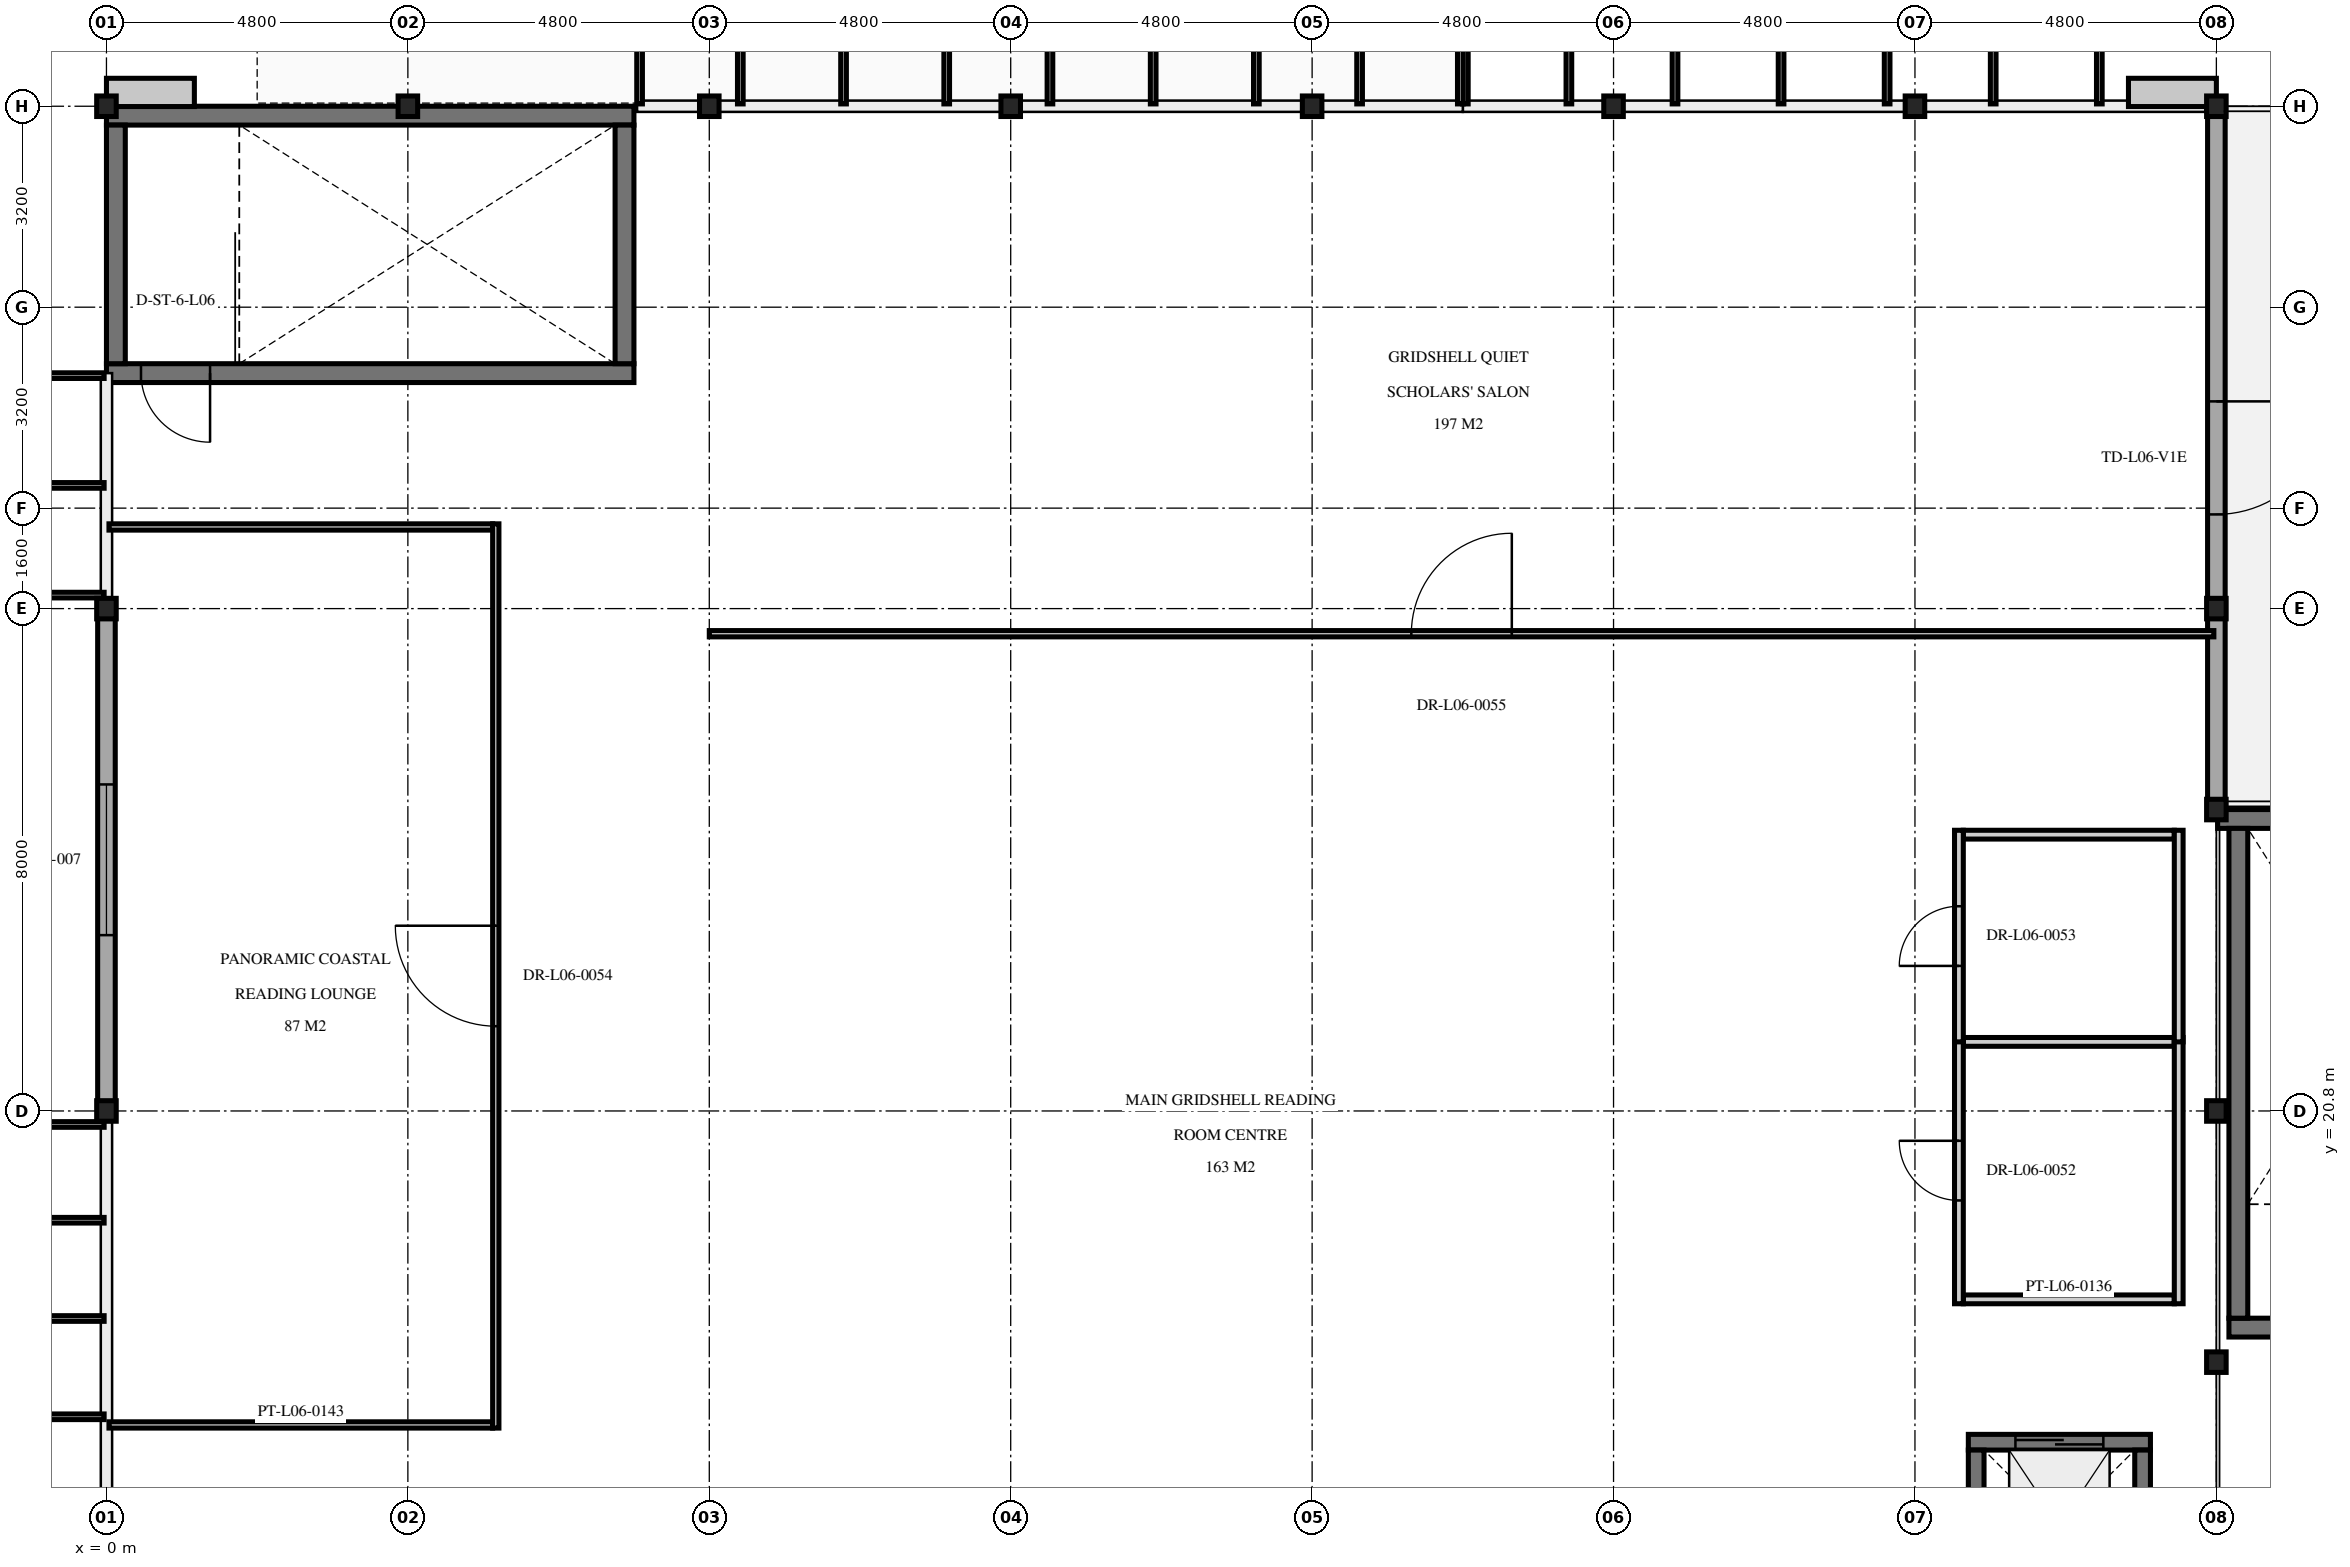
"""IFC4 building model, lengths in metres.
Left out: names, types, materials, properties, quantities, classifications, styles, units other than length and angle.
Written with IfcOpenShell. Run it as: python <this file> out.ifc"""

import sys

from ifc_helpers import new_model, si_unit, direction, frame, frame_2d, origin, origin_2d, place, context, subcontext, project, spatial, rectangle, i_section, extrude, element, fill, save


model = new_model("IFC4")
c1 = context("Model", 3, precision=1e-05, world=origin(), true_north=direction((0.0, 1.0)))
c2 = subcontext(c1, "Body", "Model", "MODEL_VIEW")
j1 = project(units=[si_unit("LENGTHUNIT", "METRE"), si_unit("PLANEANGLEUNIT", "RADIAN")], contexts=[c1])
p1 = place(None, origin())
s1 = spatial("IfcSite", under=j1, at=p1, CompositionType="ELEMENT")
p2 = place(p1, origin())
s2 = spatial("IfcBuilding", under=s1, at=p2, CompositionType="ELEMENT")
p3 = place(p2, frame((0.0, 0.0, 27.6)))
s3 = spatial("IfcBuildingStorey", under=s2, at=p3, CompositionType="ELEMENT", Elevation=27.6)
for number, where, z_axis, x_axis in (
    (1, (0.0, 36.8, 0.0), (0.0, 0.0, 1.0), (1.0, 0.0, 0.0)),
    (2, (4.8, 36.8, 0.0), (0.0, 0.0, 1.0), (1.0, 0.0, 0.0)),
    (3, (9.6, 36.8, 0.0), (0.0, 0.0, 1.0), (1.0, 0.0, 0.0)),
    (4, (14.4, 36.8, 0.0), (0.0, 0.0, 1.0), (1.0, 0.0, 0.0)),
    (5, (19.2, 36.8, 0.0), (0.0, 0.0, 1.0), (1.0, 0.0, 0.0)),
    (6, (24.0, 36.8, 0.0), (0.0, 0.0, 1.0), (1.0, 0.0, 0.0)),
    (7, (28.8, 36.8, 0.0), (0.0, 0.0, 1.0), (1.0, 0.0, 0.0)),
    (8, (33.6, 36.8, 0.0), (0.0, 0.0, 1.0), (1.0, 0.0, 0.0)),
    (9, (0.0, 20.8, 0.0), (0.0, 0.0, 1.0), (1.0, 0.0, 0.0)),
    (10, (0.0, 28.8, 0.0), (0.0, 0.0, 1.0), (1.0, 0.0, 0.0)),
    (11, (33.6, 16.8, 0.0), (0.0, 0.0, 1.0), (1.0, 0.0, 0.0)),
    (12, (33.6, 20.8, 0.0), (0.0, 0.0, 1.0), (1.0, 0.0, 0.0)),
    (13, (33.6, 25.6, 0.0), (0.0, 0.0, 1.0), (1.0, 0.0, 0.0)),
    (14, (33.6, 28.8, 0.0), (0.0, 0.0, 1.0), (1.0, 0.0, 0.0)),
):
    element("IfcColumn", number, at=place(p3, frame(where, z_axis=z_axis, x_axis=x_axis)), inside=s3, PredefinedType="COLUMN", context=c2, shape_type="SweptSolid", body=[
        extrude(i_section(OverallWidth=0.311, OverallDepth=0.327, WebThickness=0.016, FlangeThickness=0.025, at=origin_2d()), origin(), (0.0, 0.0, 1.0), 3.6),
    ])
p4 = place(p3, frame((8.4, 32.55, 0.0), z_axis=(0.0, 0.0, 1.0), x_axis=(-1.0, 0.0, 0.0)))
e15 = element("IfcWall", 15, at=p4, inside=s3, PredefinedType="SHEAR", context=c2, shape_type="SweptSolid", body=[
    extrude(rectangle(XDim=8.4, YDim=0.3, at=frame_2d((4.2, 0.0))), origin(), (0.0, 0.0, 1.0), 4.015),
])
p5 = place(p4, frame((6.75, 0.0, 0.0)))
e16 = element("IfcOpeningElement", 16, at=p5, cuts=e15, PredefinedType="OPENING", context=c2, shape_type="SweptSolid", body=[
    extrude(rectangle(XDim=1.1, YDim=2.2, at=frame_2d((0.55, 1.1))), frame((0.0, 0.16, 0.0), z_axis=(0.0, -1.0, 0.0), x_axis=(1.0, 0.0, 0.0)), (0.0, 0.0, 1.0), 0.32),
])
p6 = place(p3, frame((0.0, 36.65, 0.0), z_axis=(0.0, 0.0, 1.0), x_axis=(1.0, 0.0, 0.0)))
e17 = element("IfcWall", 17, at=p6, inside=s3, PredefinedType="SHEAR", context=c2, shape_type="SweptSolid", body=[
    extrude(rectangle(XDim=8.4, YDim=0.3, at=frame_2d((4.2, 0.0))), origin(), (0.0, 0.0, 1.0), 4.015),
])
for number, where, z_axis, x_axis in (
    (18, (0.15, 32.7, 0.0), (0.0, 0.0, 1.0), (0.0, 1.0, 0.0)),
    (19, (8.25, 36.5, 0.0), (0.0, 0.0, 1.0), (0.0, -1.0, 0.0)),
):
    element("IfcWall", number, at=place(p3, frame(where, z_axis=z_axis, x_axis=x_axis)), inside=s3, PredefinedType="SHEAR", context=c2, shape_type="SweptSolid", body=[
        extrude(rectangle(XDim=3.8, YDim=0.3, at=frame_2d((1.9, 0.0))), origin(), (0.0, 0.0, 1.0), 4.015),
    ])
p7 = place(p3, frame((38.2, 17.35, 0.0), z_axis=(0.0, 0.0, 1.0), x_axis=(-1.0, 0.0, 0.0)))
e20 = element("IfcWall", 20, at=p7, inside=s3, PredefinedType="SHEAR", context=c2, shape_type="SweptSolid", body=[
    extrude(rectangle(XDim=4.4, YDim=0.3, at=frame_2d((2.2, 0.0))), origin(), (0.0, 0.0, 1.0), 3.955),
])
p8 = place(p7, frame((1.65, 0.0, 0.0)))
e21 = element("IfcOpeningElement", 21, at=p8, cuts=e20, PredefinedType="OPENING", context=c2, shape_type="SweptSolid", body=[
    extrude(rectangle(XDim=1.1, YDim=2.2, at=frame_2d((0.55, 1.1))), frame((0.0, 0.16, 0.0), z_axis=(0.0, -1.0, 0.0), x_axis=(1.0, 0.0, 0.0)), (0.0, 0.0, 1.0), 0.32),
])
p9 = place(p3, frame((33.62, 25.45, 0.0), z_axis=(0.0, 0.0, 1.0), x_axis=(1.0, 0.0, 0.0)))
e22 = element("IfcWall", 22, at=p9, inside=s3, PredefinedType="SHEAR", context=c2, shape_type="SweptSolid", body=[
    extrude(rectangle(XDim=4.76, YDim=0.3, at=frame_2d((2.38, 0.0))), origin(), (0.0, 0.0, 1.0), 3.955),
])
p10 = place(p3, frame((33.95, 17.5, 0.0), z_axis=(0.0, 0.0, 1.0), x_axis=(0.0, 1.0, 0.0)))
e23 = element("IfcWall", 23, at=p10, inside=s3, PredefinedType="SHEAR", context=c2, shape_type="SweptSolid", body=[
    extrude(rectangle(XDim=7.8, YDim=0.3, at=frame_2d((3.9, 0.0))), origin(), (0.0, 0.0, 1.0), 3.955),
])
p11 = place(p3, frame((29.65, 15.525, 0.0), z_axis=(0.0, 0.0, 1.0), x_axis=(1.0, 0.0, 0.0)))
e24 = element("IfcWall", 24, at=p11, inside=s3, PredefinedType="SHEAR", context=c2, shape_type="SweptSolid", body=[
    extrude(rectangle(XDim=2.9, YDim=0.25, at=frame_2d((1.45, 0.0))), origin(), (0.0, 0.0, 1.0), 4.015),
])
p12 = place(p11, frame((0.75, 0.0, 0.0)))
e25 = element("IfcOpeningElement", 25, at=p12, cuts=e24, PredefinedType="OPENING", context=c2, shape_type="SweptSolid", body=[
    extrude(rectangle(XDim=1.4, YDim=2.2, at=frame_2d((0.7, 1.1))), frame((0.0, 0.135, 0.0), z_axis=(0.0, -1.0, 0.0), x_axis=(1.0, 0.0, 0.0)), (0.0, 0.0, 1.0), 0.27),
])
for number, where, z_axis, x_axis in (
    (26, (29.775, 13.0, 0.0), (0.0, 0.0, 1.0), (0.0, 1.0, 0.0)),
    (27, (32.425, 15.4, 0.0), (0.0, 0.0, 1.0), (0.0, -1.0, 0.0)),
):
    element("IfcWall", number, at=place(p3, frame(where, z_axis=z_axis, x_axis=x_axis)), inside=s3, PredefinedType="SHEAR", context=c2, shape_type="SweptSolid", body=[
        extrude(rectangle(XDim=2.4, YDim=0.25, at=frame_2d((1.2, 0.0))), origin(), (0.0, 0.0, 1.0), 4.015),
    ])
p13 = place(p3, frame((0.0, 20.715, 0.0), z_axis=(0.0, 0.0, 1.0), x_axis=(0.0, 1.0, 0.0)))
e28 = element("IfcWall", 28, at=p13, inside=s3, PredefinedType="SOLIDWALL", context=c2, shape_type="SweptSolid", body=[
    extrude(rectangle(XDim=8.17, YDim=0.28, at=frame_2d((4.085, 0.0))), origin(), (0.0, 0.0, 1.0), 3.575),
])
p14 = place(p13, frame((2.885, 0.0, 0.95)))
e29 = element("IfcOpeningElement", 29, at=p14, cuts=e28, PredefinedType="OPENING", context=c2, shape_type="SweptSolid", body=[
    extrude(rectangle(XDim=2.4, YDim=2.1, at=frame_2d((1.2, 1.05))), frame((0.0, 0.15, 0.0), z_axis=(0.0, -1.0, 0.0), x_axis=(1.0, 0.0, 0.0)), (0.0, 0.0, 1.0), 0.3),
])
p15 = place(p3, frame((33.6, 36.885, 0.0), z_axis=(0.0, 0.0, 1.0), x_axis=(0.0, -1.0, 0.0)))
e30 = element("IfcWall", 30, at=p15, inside=s3, PredefinedType="SOLIDWALL", context=c2, shape_type="SweptSolid", body=[
    extrude(rectangle(XDim=11.37, YDim=0.28, at=frame_2d((5.685, 0.0))), origin(), (0.0, 0.0, 1.0), 3.185),
])
p16 = place(p15, frame((4.785, 0.0, 0.0)))
e31 = element("IfcOpeningElement", 31, at=p16, cuts=e30, PredefinedType="OPENING", context=c2, shape_type="SweptSolid", body=[
    extrude(rectangle(XDim=1.8, YDim=2.3, at=frame_2d((0.9, 1.15))), frame((0.0, 0.15, 0.0), z_axis=(0.0, -1.0, 0.0), x_axis=(1.0, 0.0, 0.0)), (0.0, 0.0, 1.0), 0.3),
])
for number, where, z_axis, x_axis in (
    (32, (29.57, 17.8, 0.0), (0.0, 0.0, 1.0), (1.0, 0.0, 0.0)),
    (33, (29.57, 21.9, 0.0), (0.0, 0.0, 1.0), (1.0, 0.0, 0.0)),
):
    element("IfcWall", number, at=place(p3, frame(where, z_axis=z_axis, x_axis=x_axis)), inside=s3, PredefinedType="PARTITIONING", context=c2, shape_type="SweptSolid", body=[
        extrude(rectangle(XDim=3.36, YDim=0.14, at=frame_2d((1.68, 0.0))), origin(), (0.0, 0.0, 1.0), 4.0),
    ])
p17 = place(p3, frame((29.5, 17.73, 0.0), z_axis=(0.0, 0.0, 1.0), x_axis=(0.0, 1.0, 0.0)))
e34 = element("IfcWall", 34, at=p17, inside=s3, PredefinedType="PARTITIONING", context=c2, shape_type="SweptSolid", body=[
    extrude(rectangle(XDim=4.24, YDim=0.14, at=frame_2d((2.12, 0.0))), origin(), (0.0, 0.0, 1.0), 4.0),
])
p18 = place(p17, frame((1.645, 0.0, 0.0)))
e35 = element("IfcOpeningElement", 35, at=p18, cuts=e34, PredefinedType="OPENING", context=c2, shape_type="SweptSolid", body=[
    extrude(rectangle(XDim=0.95, YDim=2.1, at=frame_2d((0.475, 1.05))), frame((0.0, 0.08, 0.0), z_axis=(0.0, -1.0, 0.0), x_axis=(1.0, 0.0, 0.0)), (0.0, 0.0, 1.0), 0.16),
])
p19 = place(p3, frame((33.0, 17.73, 0.0), z_axis=(0.0, 0.0, 1.0), x_axis=(0.0, 1.0, 0.0)))
e36 = element("IfcWall", 36, at=p19, inside=s3, PredefinedType="PARTITIONING", context=c2, shape_type="SweptSolid", body=[
    extrude(rectangle(XDim=4.24, YDim=0.14, at=frame_2d((2.12, 0.0))), origin(), (0.0, 0.0, 1.0), 4.0),
])
p20 = place(p3, frame((29.57, 25.2, 0.0), z_axis=(0.0, 0.0, 1.0), x_axis=(1.0, 0.0, 0.0)))
e37 = element("IfcWall", 37, at=p20, inside=s3, PredefinedType="PARTITIONING", context=c2, shape_type="SweptSolid", body=[
    extrude(rectangle(XDim=3.36, YDim=0.14, at=frame_2d((1.68, 0.0))), origin(), (0.0, 0.0, 1.0), 4.0),
])
p21 = place(p3, frame((29.5, 21.9, 0.0), z_axis=(0.0, 0.0, 1.0), x_axis=(0.0, 1.0, 0.0)))
e38 = element("IfcWall", 38, at=p21, inside=s3, PredefinedType="PARTITIONING", context=c2, shape_type="SweptSolid", body=[
    extrude(rectangle(XDim=3.37, YDim=0.14, at=frame_2d((1.685, 0.0))), origin(), (0.0, 0.0, 1.0), 4.0),
])
p22 = place(p21, frame((1.21, 0.0, 0.0)))
e39 = element("IfcOpeningElement", 39, at=p22, cuts=e38, PredefinedType="OPENING", context=c2, shape_type="SweptSolid", body=[
    extrude(rectangle(XDim=0.95, YDim=2.1, at=frame_2d((0.475, 1.05))), frame((0.0, 0.08, 0.0), z_axis=(0.0, -1.0, 0.0), x_axis=(1.0, 0.0, 0.0)), (0.0, 0.0, 1.0), 0.16),
])
p23 = place(p3, frame((33.0, 21.9, 0.0), z_axis=(0.0, 0.0, 1.0), x_axis=(0.0, 1.0, 0.0)))
e40 = element("IfcWall", 40, at=p23, inside=s3, PredefinedType="PARTITIONING", context=c2, shape_type="SweptSolid", body=[
    extrude(rectangle(XDim=3.37, YDim=0.14, at=frame_2d((1.685, 0.0))), origin(), (0.0, 0.0, 1.0), 4.0),
])
for number, where, z_axis, x_axis in (
    (41, (0.04, 15.8, 0.0), (0.0, 0.0, 1.0), (1.0, 0.0, 0.0)),
    (42, (0.04, 30.1, 0.0), (0.0, 0.0, 1.0), (1.0, 0.0, 0.0)),
):
    element("IfcWall", number, at=place(p3, frame(where, z_axis=z_axis, x_axis=x_axis)), inside=s3, PredefinedType="MOVABLE", context=c2, shape_type="SweptSolid", body=[
        extrude(rectangle(XDim=6.11, YDim=0.1, at=frame_2d((3.055, 0.0))), origin(), (0.0, 0.0, 1.0), 3.575),
    ])
p24 = place(p3, frame((6.2, 15.75, 0.0), z_axis=(0.0, 0.0, 1.0), x_axis=(0.0, 1.0, 0.0)))
e43 = element("IfcWall", 43, at=p24, inside=s3, PredefinedType="MOVABLE", context=c2, shape_type="SweptSolid", body=[
    extrude(rectangle(XDim=14.4, YDim=0.1, at=frame_2d((7.2, 0.0))), origin(), (0.0, 0.0, 1.0), 4.0),
])
p25 = place(p24, frame((6.4, 0.0, 0.0)))
e44 = element("IfcOpeningElement", 44, at=p25, cuts=e43, PredefinedType="OPENING", context=c2, shape_type="SweptSolid", body=[
    extrude(rectangle(XDim=1.6, YDim=2.25, at=frame_2d((0.8, 1.125))), frame((0.0, 0.06, 0.0), z_axis=(0.0, -1.0, 0.0), x_axis=(1.0, 0.0, 0.0)), (0.0, 0.0, 1.0), 0.12),
])
p26 = place(p3, frame((9.6, 28.4, 0.0), z_axis=(0.0, 0.0, 1.0), x_axis=(1.0, 0.0, 0.0)))
e45 = element("IfcWall", 45, at=p26, inside=s3, PredefinedType="MOVABLE", context=c2, shape_type="SweptSolid", body=[
    extrude(rectangle(XDim=23.96, YDim=0.1, at=frame_2d((11.98, 0.0))), origin(), (0.0, 0.0, 1.0), 3.575),
])
p27 = place(p26, frame((11.18, 0.0, 0.0)))
e46 = element("IfcOpeningElement", 46, at=p27, cuts=e45, PredefinedType="OPENING", context=c2, shape_type="SweptSolid", body=[
    extrude(rectangle(XDim=1.6, YDim=2.25, at=frame_2d((0.8, 1.125))), frame((0.0, 0.06, 0.0), z_axis=(0.0, -1.0, 0.0), x_axis=(1.0, 0.0, 0.0)), (0.0, 0.0, 1.0), 0.12),
])
p28 = place(p5, origin())
e47 = element("IfcDoor", 47, at=p28, inside=s3, OperationType="SINGLE_SWING_LEFT", PredefinedType="DOOR", context=c2, shape_type="SweptSolid", body=[
    extrude(rectangle(XDim=1.1, YDim=2.2, at=frame_2d((0.55, 1.1))), frame((0.0, 0.025, 0.0), z_axis=(0.0, -1.0, 0.0), x_axis=(1.0, 0.0, 0.0)), (0.0, 0.0, 1.0), 0.05),
])
fill(e16, e47)
p29 = place(p12, origin())
e48 = element("IfcDoor", 48, at=p29, inside=s3, OperationType="DOUBLE_DOOR_SLIDING", PredefinedType="DOOR", context=c2, shape_type="SweptSolid", body=[
    extrude(rectangle(XDim=1.4, YDim=2.2, at=frame_2d((0.7, 1.1))), frame((0.0, 0.025, 0.0), z_axis=(0.0, -1.0, 0.0), x_axis=(1.0, 0.0, 0.0)), (0.0, 0.0, 1.0), 0.05),
])
fill(e25, e48)
p30 = place(p14, origin())
e49 = element("IfcWindow", 49, at=p30, inside=s3, PartitioningType="SINGLE_PANEL", PredefinedType="WINDOW", context=c2, shape_type="SweptSolid", body=[
    extrude(rectangle(XDim=2.4, YDim=2.1, at=frame_2d((1.2, 1.05))), frame((0.0, 0.03, 0.0), z_axis=(0.0, -1.0, 0.0), x_axis=(1.0, 0.0, 0.0)), (0.0, 0.0, 1.0), 0.06),
])
fill(e29, e49)
p31 = place(p16, origin())
e50 = element("IfcDoor", 50, at=p31, inside=s3, OperationType="SINGLE_SWING_LEFT", PredefinedType="DOOR", context=c2, shape_type="SweptSolid", body=[
    extrude(rectangle(XDim=1.8, YDim=2.3, at=frame_2d((0.9, 1.15))), frame((0.0, 0.025, 0.0), z_axis=(0.0, -1.0, 0.0), x_axis=(1.0, 0.0, 0.0)), (0.0, 0.0, 1.0), 0.05),
])
fill(e31, e50)
p32 = place(p18, origin())
e51 = element("IfcDoor", 51, at=p32, inside=s3, OperationType="SINGLE_SWING_RIGHT", PredefinedType="DOOR", context=c2, shape_type="SweptSolid", body=[
    extrude(rectangle(XDim=0.95, YDim=2.1, at=frame_2d((0.475, 1.05))), frame((0.0, 0.025, 0.0), z_axis=(0.0, -1.0, 0.0), x_axis=(1.0, 0.0, 0.0)), (0.0, 0.0, 1.0), 0.05),
])
fill(e35, e51)
p33 = place(p22, origin())
e52 = element("IfcDoor", 52, at=p33, inside=s3, OperationType="SINGLE_SWING_LEFT", PredefinedType="DOOR", context=c2, shape_type="SweptSolid", body=[
    extrude(rectangle(XDim=0.95, YDim=2.1, at=frame_2d((0.475, 1.05))), frame((0.0, 0.025, 0.0), z_axis=(0.0, -1.0, 0.0), x_axis=(1.0, 0.0, 0.0)), (0.0, 0.0, 1.0), 0.05),
])
fill(e39, e52)
p34 = place(p25, origin())
e53 = element("IfcDoor", 53, at=p34, inside=s3, OperationType="DOUBLE_DOOR_SINGLE_SWING", PredefinedType="DOOR", context=c2, shape_type="SweptSolid", body=[
    extrude(rectangle(XDim=1.6, YDim=2.25, at=frame_2d((0.8, 1.125))), frame((0.0, 0.025, 0.0), z_axis=(0.0, -1.0, 0.0), x_axis=(1.0, 0.0, 0.0)), (0.0, 0.0, 1.0), 0.05),
])
fill(e44, e53)
p35 = place(p27, origin())
e54 = element("IfcDoor", 54, at=p35, inside=s3, OperationType="DOUBLE_DOOR_SINGLE_SWING", PredefinedType="DOOR", context=c2, shape_type="SweptSolid", body=[
    extrude(rectangle(XDim=1.6, YDim=2.25, at=frame_2d((0.8, 1.125))), frame((0.0, 0.025, 0.0), z_axis=(0.0, -1.0, 0.0), x_axis=(1.0, 0.0, 0.0)), (0.0, 0.0, 1.0), 0.05),
])
fill(e46, e54)
save(model, sys.argv[1])
